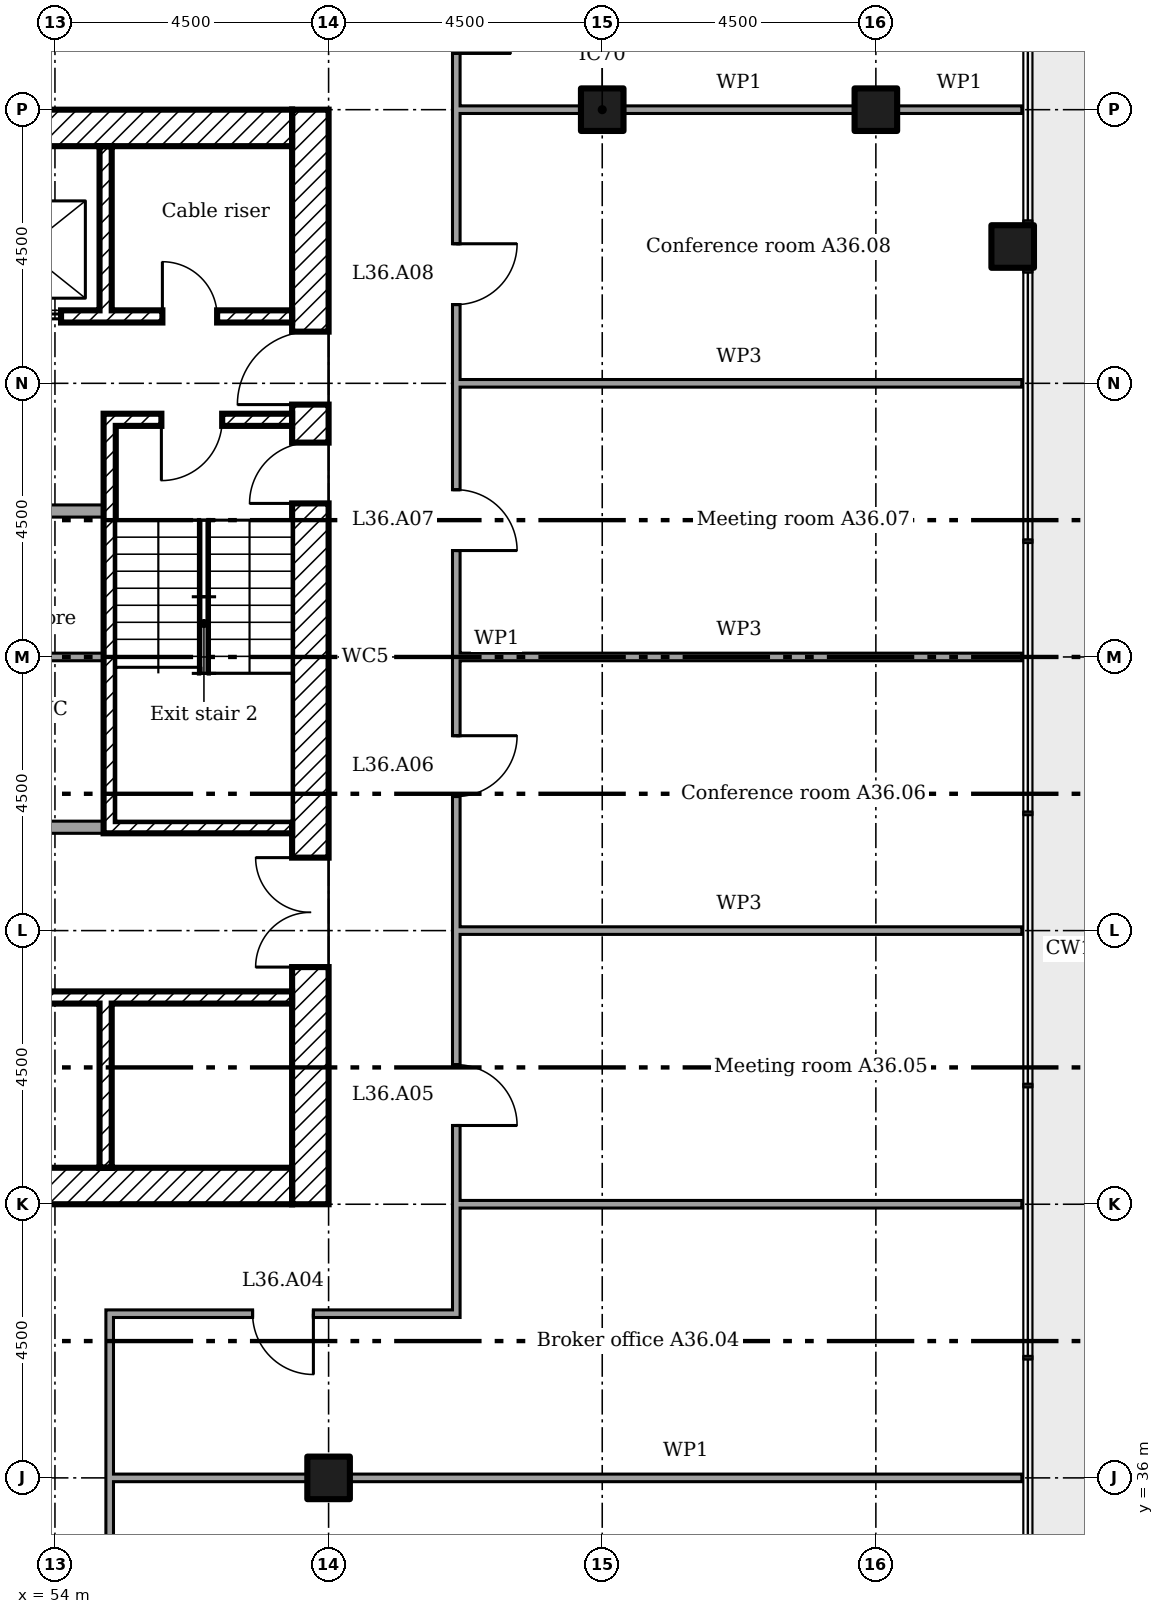
"""IFC4 building model, lengths in metres.
Left out: names, types, materials, properties, quantities, classifications, styles, units other than length and angle.
Written with IfcOpenShell. Run it as: python <this file> out.ifc"""

import sys

from ifc_helpers import new_model, si_unit, direction, frame, frame_2d, origin, origin_2d, place, context, subcontext, project, spatial, rectangle, extrude, element, fill, save


model = new_model("IFC4")
c1 = context("Model", 3, precision=1e-05, world=origin(), true_north=direction((0.0, 1.0)))
c2 = subcontext(c1, "Body", "Model", "MODEL_VIEW")
j1 = project(units=[si_unit("LENGTHUNIT", "METRE"), si_unit("PLANEANGLEUNIT", "RADIAN")], contexts=[c1])
p1 = place(None, origin())
s1 = spatial("IfcSite", under=j1, at=p1, CompositionType="ELEMENT")
p2 = place(p1, origin())
s2 = spatial("IfcBuilding", under=s1, at=p2, CompositionType="ELEMENT")
p3 = place(p2, frame((0.0, 0.0, 147.4)))
s3 = spatial("IfcBuildingStorey", under=s2, at=p3, CompositionType="ELEMENT", Elevation=147.4)
for number, where in (
    (1, (58.5, 36.0, 0.0)),
    (2, (63.0, 58.5, 0.0)),
    (3, (67.5, 58.5, 0.0)),
    (4, (69.75, 56.25, 0.0)),
):
    element("IfcColumn", number, at=place(p3, frame(where)), inside=s3, PredefinedType="COLUMN", context=c2, shape_type="SweptSolid", body=[
        extrude(rectangle(XDim=0.7, YDim=0.7, at=origin_2d()), origin(), (0.0, 0.0, 1.0), 3.6),
    ])
p4 = place(p3, frame((58.2, 40.5, 0.0), z_axis=(0.0, 0.0, 1.0), x_axis=(0.0, 1.0, 0.0)))
e5 = element("IfcWall", 5, at=p4, inside=s3, PredefinedType="SHEAR", context=c2, shape_type="SweptSolid", body=[
    extrude(rectangle(XDim=18.0, YDim=0.6, at=frame_2d((9.0, 0.0))), origin(), (0.0, 0.0, 1.0), 3.35),
])
p5 = place(p4, frame((13.15, 0.0, 0.0)))
e6 = element("IfcOpeningElement", 6, at=p5, cuts=e5, PredefinedType="OPENING", context=c2, shape_type="SweptSolid", body=[
    extrude(rectangle(XDim=1.2, YDim=2.1, at=frame_2d((0.6, 1.05))), frame((0.0, 0.31, 0.0), z_axis=(0.0, -1.0, 0.0), x_axis=(1.0, 0.0, 0.0)), (0.0, 0.0, 1.0), 0.62),
])
p6 = place(p4, frame((3.9, 0.0, 0.0)))
e7 = element("IfcOpeningElement", 7, at=p6, cuts=e5, PredefinedType="OPENING", context=c2, shape_type="SweptSolid", body=[
    extrude(rectangle(XDim=1.8, YDim=2.1, at=frame_2d((0.9, 1.05))), frame((0.0, 0.31, 0.0), z_axis=(0.0, -1.0, 0.0), x_axis=(1.0, 0.0, 0.0)), (0.0, 0.0, 1.0), 0.62),
])
p7 = place(p4, frame((11.525, 0.0, 0.0)))
e8 = element("IfcOpeningElement", 8, at=p7, cuts=e5, PredefinedType="OPENING", context=c2, shape_type="SweptSolid", body=[
    extrude(rectangle(XDim=1.0, YDim=2.1, at=frame_2d((0.5, 1.05))), frame((0.0, 0.31, 0.0), z_axis=(0.0, -1.0, 0.0), x_axis=(1.0, 0.0, 0.0)), (0.0, 0.0, 1.0), 0.62),
])
for number, where in (
    (9, (40.5, 58.2, 0.0)),
    (10, (40.5, 40.8, 0.0)),
):
    element("IfcWall", number, at=place(p3, frame(where)), inside=s3, PredefinedType="SHEAR", context=c2, shape_type="SweptSolid", body=[
        extrude(rectangle(XDim=17.4, YDim=0.6, at=frame_2d((8.7, 0.0))), origin(), (0.0, 0.0, 1.0), 3.35),
    ])
for number, where, z_axis, x_axis in (
    (11, (54.833, 57.9, 0.0), (0.0, 0.0, 1.0), (0.0, -1.0, 0.0)),
    (12, (54.833, 41.1, 0.0), (0.0, 0.0, 1.0), (0.0, 1.0, 0.0)),
):
    element("IfcWall", number, at=place(p3, frame(where, z_axis=z_axis, x_axis=x_axis)), inside=s3, PredefinedType="SHEAR", context=c2, shape_type="SweptSolid", body=[
        extrude(rectangle(XDim=2.7, YDim=0.2, at=frame_2d((1.35, 0.0))), origin(), (0.0, 0.0, 1.0), 3.35),
    ])
p8 = place(p3, frame((46.933, 55.1, 0.0)))
e13 = element("IfcWall", 13, at=p8, inside=s3, PredefinedType="SHEAR", context=c2, shape_type="SweptSolid", body=[
    extrude(rectangle(XDim=10.967, YDim=0.2, at=frame_2d((5.483, 0.0))), origin(), (0.0, 0.0, 1.0), 3.35),
])
p9 = place(p8, frame((8.833, 0.0, 0.0)))
e14 = element("IfcOpeningElement", 14, at=p9, cuts=e13, PredefinedType="OPENING", context=c2, shape_type="SweptSolid", body=[
    extrude(rectangle(XDim=0.9, YDim=2.1, at=frame_2d((0.45, 1.05))), frame((0.0, 0.11, 0.0), z_axis=(0.0, -1.0, 0.0), x_axis=(1.0, 0.0, 0.0)), (0.0, 0.0, 1.0), 0.22),
])
p10 = place(p8, frame((0.633, 0.0, 0.0)))
e15 = element("IfcOpeningElement", 15, at=p10, cuts=e13, PredefinedType="OPENING", context=c2, shape_type="SweptSolid", body=[
    extrude(rectangle(XDim=1.2, YDim=2.1, at=frame_2d((0.6, 1.05))), frame((0.0, 0.11, 0.0), z_axis=(0.0, -1.0, 0.0), x_axis=(1.0, 0.0, 0.0)), (0.0, 0.0, 1.0), 0.22),
])
p11 = place(p8, frame((3.3, 0.0, 0.0)))
e16 = element("IfcOpeningElement", 16, at=p11, cuts=e13, PredefinedType="OPENING", context=c2, shape_type="SweptSolid", body=[
    extrude(rectangle(XDim=1.2, YDim=2.1, at=frame_2d((0.6, 1.05))), frame((0.0, 0.11, 0.0), z_axis=(0.0, -1.0, 0.0), x_axis=(1.0, 0.0, 0.0)), (0.0, 0.0, 1.0), 0.22),
])
p12 = place(p8, frame((5.967, 0.0, 0.0)))
e17 = element("IfcOpeningElement", 17, at=p12, cuts=e13, PredefinedType="OPENING", context=c2, shape_type="SweptSolid", body=[
    extrude(rectangle(XDim=1.2, YDim=2.1, at=frame_2d((0.6, 1.05))), frame((0.0, 0.11, 0.0), z_axis=(0.0, -1.0, 0.0), x_axis=(1.0, 0.0, 0.0)), (0.0, 0.0, 1.0), 0.22),
])
p13 = place(p3, frame((41.1, 43.9, 0.0)))
e18 = element("IfcWall", 18, at=p13, inside=s3, PredefinedType="SHEAR", context=c2, shape_type="SweptSolid", body=[
    extrude(rectangle(XDim=16.8, YDim=0.2, at=frame_2d((8.4, 0.0))), origin(), (0.0, 0.0, 1.0), 3.35),
])
p14 = place(p13, frame((6.617, 0.0, 0.0)))
e19 = element("IfcOpeningElement", 19, at=p14, cuts=e18, PredefinedType="OPENING", context=c2, shape_type="SweptSolid", body=[
    extrude(rectangle(XDim=0.9, YDim=2.1, at=frame_2d((0.45, 1.05))), frame((0.0, 0.11, 0.0), z_axis=(0.0, -1.0, 0.0), x_axis=(1.0, 0.0, 0.0)), (0.0, 0.0, 1.0), 0.22),
])
p15 = place(p3, frame((54.8, 53.4, 0.0)))
e20 = element("IfcWall", 20, at=p15, inside=s3, PredefinedType="SHEAR", context=c2, shape_type="SweptSolid", body=[
    extrude(rectangle(XDim=3.1, YDim=0.2, at=frame_2d((1.55, 0.0))), origin(), (0.0, 0.0, 1.0), 3.35),
])
p16 = place(p15, frame((0.95, 0.0, 0.0)))
e21 = element("IfcOpeningElement", 21, at=p16, cuts=e20, PredefinedType="OPENING", context=c2, shape_type="SweptSolid", body=[
    extrude(rectangle(XDim=1.0, YDim=2.1, at=frame_2d((0.5, 1.05))), frame((0.0, 0.11, 0.0), z_axis=(0.0, -1.0, 0.0), x_axis=(1.0, 0.0, 0.0)), (0.0, 0.0, 1.0), 0.22),
])
p17 = place(p3, frame((54.8, 46.7, 0.0)))
e22 = element("IfcWall", 22, at=p17, inside=s3, PredefinedType="SHEAR", context=c2, shape_type="SweptSolid", body=[
    extrude(rectangle(XDim=3.1, YDim=0.2, at=frame_2d((1.55, 0.0))), origin(), (0.0, 0.0, 1.0), 3.35),
])
p18 = place(p3, frame((54.9, 46.8, 0.0), z_axis=(0.0, 0.0, 1.0), x_axis=(0.0, 1.0, 0.0)))
e23 = element("IfcWall", 23, at=p18, inside=s3, PredefinedType="SHEAR", context=c2, shape_type="SweptSolid", body=[
    extrude(rectangle(XDim=6.5, YDim=0.2, at=frame_2d((3.25, 0.0))), origin(), (0.0, 0.0, 1.0), 3.35),
])
p19 = place(p3, frame((44.2, 51.9, 0.0)))
e24 = element("IfcWall", 24, at=p19, inside=s3, PredefinedType="PARTITIONING", context=c2, shape_type="SweptSolid", body=[
    extrude(rectangle(XDim=10.6, YDim=0.2, at=frame_2d((5.3, 0.0))), origin(), (0.0, 0.0, 1.0), 3.35),
])
p20 = place(p19, frame((8.45, 0.0, 0.0)))
e25 = element("IfcOpeningElement", 25, at=p20, cuts=e24, PredefinedType="OPENING", context=c2, shape_type="SweptSolid", body=[
    extrude(rectangle(XDim=0.9, YDim=2.1, at=frame_2d((0.45, 1.05))), frame((0.0, 0.11, 0.0), z_axis=(0.0, -1.0, 0.0), x_axis=(1.0, 0.0, 0.0)), (0.0, 0.0, 1.0), 0.22),
])
p21 = place(p3, frame((44.2, 46.7, 0.0)))
e26 = element("IfcWall", 26, at=p21, inside=s3, PredefinedType="PARTITIONING", context=c2, shape_type="SweptSolid", body=[
    extrude(rectangle(XDim=10.6, YDim=0.2, at=frame_2d((5.3, 0.0))), origin(), (0.0, 0.0, 1.0), 3.35),
])
p22 = place(p21, frame((1.4, 0.0, 0.0)))
e27 = element("IfcOpeningElement", 27, at=p22, cuts=e26, PredefinedType="OPENING", context=c2, shape_type="SweptSolid", body=[
    extrude(rectangle(XDim=0.9, YDim=2.1, at=frame_2d((0.45, 1.05))), frame((0.0, 0.11, 0.0), z_axis=(0.0, -1.0, 0.0), x_axis=(1.0, 0.0, 0.0)), (0.0, 0.0, 1.0), 0.22),
])
p23 = place(p21, frame((5.0, 0.0, 0.0)))
e28 = element("IfcOpeningElement", 28, at=p23, cuts=e26, PredefinedType="OPENING", context=c2, shape_type="SweptSolid", body=[
    extrude(rectangle(XDim=0.9, YDim=2.1, at=frame_2d((0.45, 1.05))), frame((0.0, 0.11, 0.0), z_axis=(0.0, -1.0, 0.0), x_axis=(1.0, 0.0, 0.0)), (0.0, 0.0, 1.0), 0.22),
])
p24 = place(p21, frame((8.45, 0.0, 0.0)))
e29 = element("IfcOpeningElement", 29, at=p24, cuts=e26, PredefinedType="OPENING", context=c2, shape_type="SweptSolid", body=[
    extrude(rectangle(XDim=0.9, YDim=2.1, at=frame_2d((0.45, 1.05))), frame((0.0, 0.11, 0.0), z_axis=(0.0, -1.0, 0.0), x_axis=(1.0, 0.0, 0.0)), (0.0, 0.0, 1.0), 0.22),
])
p25 = place(p3, frame((54.8, 49.5, 0.0), z_axis=(0.0, 0.0, 1.0), x_axis=(-1.0, 0.0, 0.0)))
e30 = element("IfcWall", 30, at=p25, inside=s3, PredefinedType="PARTITIONING", context=c2, shape_type="SweptSolid", body=[
    extrude(rectangle(XDim=3.338, YDim=0.125, at=frame_2d((1.669, 0.0))), origin(), (0.0, 0.0, 1.0), 3.35),
])
p26 = place(p3, frame((54.9, 36.0, 0.0)))
e31 = element("IfcWall", 31, at=p26, inside=s3, PredefinedType="PARTITIONING", context=c2, shape_type="SweptSolid", body=[
    extrude(rectangle(XDim=3.25, YDim=0.125, at=frame_2d((1.625, 0.0))), origin(), (0.0, 0.0, 1.0), 3.45),
])
p27 = place(p3, frame((58.85, 36.0, 0.0)))
e32 = element("IfcWall", 32, at=p27, inside=s3, PredefinedType="PARTITIONING", context=c2, shape_type="SweptSolid", body=[
    extrude(rectangle(XDim=11.05, YDim=0.125, at=frame_2d((5.525, 0.0))), origin(), (0.0, 0.0, 1.0), 2.766),
])
p28 = place(p3, frame((54.837, 38.7, 0.0)))
e33 = element("IfcWall", 33, at=p28, inside=s3, PredefinedType="PARTITIONING", context=c2, shape_type="SweptSolid", body=[
    extrude(rectangle(XDim=5.825, YDim=0.125, at=frame_2d((2.913, 0.0))), origin(), (0.0, 0.0, 1.0), 3.45),
])
p29 = place(p28, frame((2.413, 0.0, 0.0)))
e34 = element("IfcOpeningElement", 34, at=p29, cuts=e33, PredefinedType="OPENING", context=c2, shape_type="SweptSolid", body=[
    extrude(rectangle(XDim=1.0, YDim=2.1, at=frame_2d((0.5, 1.05))), frame((0.0, 0.073, 0.0), z_axis=(0.0, -1.0, 0.0), x_axis=(1.0, 0.0, 0.0)), (0.0, 0.0, 1.0), 0.145),
])
p30 = place(p3, frame((60.6, 40.5, 0.0)))
e35 = element("IfcWall", 35, at=p30, inside=s3, PredefinedType="PARTITIONING", context=c2, shape_type="SweptSolid", body=[
    extrude(rectangle(XDim=9.3, YDim=0.125, at=frame_2d((4.65, 0.0))), origin(), (0.0, 0.0, 1.0), 2.766),
])
for number, where in (
    (36, (60.6, 45.0, 0.0)),
    (37, (60.6, 49.5, 0.0)),
    (38, (60.6, 54.0, 0.0)),
):
    element("IfcWall", number, at=place(p3, frame(where)), inside=s3, PredefinedType="MOVABLE", context=c2, shape_type="SweptSolid", body=[
        extrude(rectangle(XDim=9.3, YDim=0.125, at=frame_2d((4.65, 0.0))), origin(), (0.0, 0.0, 1.0), 2.766),
    ])
p31 = place(p3, frame((60.6, 58.5, 0.0)))
e39 = element("IfcWall", 39, at=p31, inside=s3, PredefinedType="PARTITIONING", context=c2, shape_type="SweptSolid", body=[
    extrude(rectangle(XDim=2.05, YDim=0.125, at=frame_2d((1.025, 0.0))), origin(), (0.0, 0.0, 1.0), 2.676),
])
p32 = place(p3, frame((63.35, 58.5, 0.0)))
e40 = element("IfcWall", 40, at=p32, inside=s3, PredefinedType="PARTITIONING", context=c2, shape_type="SweptSolid", body=[
    extrude(rectangle(XDim=3.8, YDim=0.125, at=frame_2d((1.9, 0.0))), origin(), (0.0, 0.0, 1.0), 2.676),
])
p33 = place(p3, frame((67.85, 58.5, 0.0)))
e41 = element("IfcWall", 41, at=p33, inside=s3, PredefinedType="PARTITIONING", context=c2, shape_type="SweptSolid", body=[
    extrude(rectangle(XDim=2.05, YDim=0.125, at=frame_2d((1.025, 0.0))), origin(), (0.0, 0.0, 1.0), 2.676),
])
p34 = place(p3, frame((54.9, 29.1, 0.0), z_axis=(0.0, 0.0, 1.0), x_axis=(0.0, 1.0, 0.0)))
e42 = element("IfcWall", 42, at=p34, inside=s3, PredefinedType="PARTITIONING", context=c2, shape_type="SweptSolid", body=[
    extrude(rectangle(XDim=9.537, YDim=0.125, at=frame_2d((4.769, 0.0))), origin(), (0.0, 0.0, 1.0), 3.45),
])
p35 = place(p34, frame((3.825, 0.0, 0.0)))
e43 = element("IfcOpeningElement", 43, at=p35, cuts=e42, PredefinedType="OPENING", context=c2, shape_type="SweptSolid", body=[
    extrude(rectangle(XDim=1.0, YDim=2.1, at=frame_2d((0.5, 1.05))), frame((0.0, 0.073, 0.0), z_axis=(0.0, -1.0, 0.0), x_axis=(1.0, 0.0, 0.0)), (0.0, 0.0, 1.0), 0.145),
])
p36 = place(p3, frame((60.6, 38.762, 0.0), z_axis=(0.0, 0.0, 1.0), x_axis=(0.0, 1.0, 0.0)))
e44 = element("IfcWall", 44, at=p36, inside=s3, PredefinedType="PARTITIONING", context=c2, shape_type="SweptSolid", body=[
    extrude(rectangle(XDim=22.075, YDim=0.125, at=frame_2d((11.038, 0.0))), origin(), (0.0, 0.0, 1.0), 3.45),
])
p37 = place(p36, frame((3.032, 0.0, 0.0)))
e45 = element("IfcOpeningElement", 45, at=p37, cuts=e44, PredefinedType="OPENING", context=c2, shape_type="SweptSolid", body=[
    extrude(rectangle(XDim=1.0, YDim=2.1, at=frame_2d((0.5, 1.05))), frame((0.0, 0.073, 0.0), z_axis=(0.0, -1.0, 0.0), x_axis=(1.0, 0.0, 0.0)), (0.0, 0.0, 1.0), 0.145),
])
p38 = place(p36, frame((8.442, 0.0, 0.0)))
e46 = element("IfcOpeningElement", 46, at=p38, cuts=e44, PredefinedType="OPENING", context=c2, shape_type="SweptSolid", body=[
    extrude(rectangle(XDim=1.0, YDim=2.1, at=frame_2d((0.5, 1.05))), frame((0.0, 0.073, 0.0), z_axis=(0.0, -1.0, 0.0), x_axis=(1.0, 0.0, 0.0)), (0.0, 0.0, 1.0), 0.145),
])
p39 = place(p36, frame((12.488, 0.0, 0.0)))
e47 = element("IfcOpeningElement", 47, at=p39, cuts=e44, PredefinedType="OPENING", context=c2, shape_type="SweptSolid", body=[
    extrude(rectangle(XDim=1.0, YDim=2.1, at=frame_2d((0.5, 1.05))), frame((0.0, 0.073, 0.0), z_axis=(0.0, -1.0, 0.0), x_axis=(1.0, 0.0, 0.0)), (0.0, 0.0, 1.0), 0.145),
])
p40 = place(p36, frame((16.532, 0.0, 0.0)))
e48 = element("IfcOpeningElement", 48, at=p40, cuts=e44, PredefinedType="OPENING", context=c2, shape_type="SweptSolid", body=[
    extrude(rectangle(XDim=1.0, YDim=2.1, at=frame_2d((0.5, 1.05))), frame((0.0, 0.073, 0.0), z_axis=(0.0, -1.0, 0.0), x_axis=(1.0, 0.0, 0.0)), (0.0, 0.0, 1.0), 0.145),
])
p41 = place(p36, frame((20.663, 0.0, 0.0)))
e49 = element("IfcOpeningElement", 49, at=p41, cuts=e44, PredefinedType="OPENING", context=c2, shape_type="SweptSolid", body=[
    extrude(rectangle(XDim=0.9, YDim=2.1, at=frame_2d((0.45, 1.05))), frame((0.0, 0.073, 0.0), z_axis=(0.0, -1.0, 0.0), x_axis=(1.0, 0.0, 0.0)), (0.0, 0.0, 1.0), 0.145),
])
p42 = place(p5, origin())
e50 = element("IfcDoor", 50, at=p42, inside=s3, OperationType="SINGLE_SWING_RIGHT", PredefinedType="DOOR", context=c2, shape_type="SweptSolid", body=[
    extrude(rectangle(XDim=1.2, YDim=2.1, at=frame_2d((0.6, 1.05))), frame((0.0, 0.025, 0.0), z_axis=(0.0, -1.0, 0.0), x_axis=(1.0, 0.0, 0.0)), (0.0, 0.0, 1.0), 0.05),
])
fill(e6, e50)
p43 = place(p6, origin())
e51 = element("IfcDoor", 51, at=p43, inside=s3, OperationType="DOUBLE_DOOR_SINGLE_SWING", PredefinedType="DOOR", context=c2, shape_type="SweptSolid", body=[
    extrude(rectangle(XDim=1.8, YDim=2.1, at=frame_2d((0.9, 1.05))), frame((0.0, 0.025, 0.0), z_axis=(0.0, -1.0, 0.0), x_axis=(1.0, 0.0, 0.0)), (0.0, 0.0, 1.0), 0.05),
])
fill(e7, e51)
p44 = place(p16, frame((1.0, 0.0, 0.0), x_axis=(-1.0, 0.0, 0.0)))
e52 = element("IfcDoor", 52, at=p44, inside=s3, OperationType="SINGLE_SWING_LEFT", PredefinedType="DOOR", context=c2, shape_type="SweptSolid", body=[
    extrude(rectangle(XDim=1.0, YDim=2.1, at=frame_2d((0.5, 1.05))), frame((0.0, 0.025, 0.0), z_axis=(0.0, -1.0, 0.0), x_axis=(1.0, 0.0, 0.0)), (0.0, 0.0, 1.0), 0.05),
])
fill(e21, e52)
p45 = place(p7, origin())
e53 = element("IfcDoor", 53, at=p45, inside=s3, OperationType="SINGLE_SWING_RIGHT", PredefinedType="DOOR", context=c2, shape_type="SweptSolid", body=[
    extrude(rectangle(XDim=1.0, YDim=2.1, at=frame_2d((0.5, 1.05))), frame((0.0, 0.025, 0.0), z_axis=(0.0, -1.0, 0.0), x_axis=(1.0, 0.0, 0.0)), (0.0, 0.0, 1.0), 0.05),
])
fill(e8, e53)
p46 = place(p9, origin())
e54 = element("IfcDoor", 54, at=p46, inside=s3, OperationType="SINGLE_SWING_RIGHT", PredefinedType="DOOR", context=c2, shape_type="SweptSolid", body=[
    extrude(rectangle(XDim=0.9, YDim=2.1, at=frame_2d((0.45, 1.05))), frame((0.0, 0.025, 0.0), z_axis=(0.0, -1.0, 0.0), x_axis=(1.0, 0.0, 0.0)), (0.0, 0.0, 1.0), 0.05),
])
fill(e14, e54)
p47 = place(p12, origin())
e55 = element("IfcDoor", 55, at=p47, inside=s3, OperationType="SLIDING_TO_LEFT", PredefinedType="DOOR", context=c2, shape_type="SweptSolid", body=[
    extrude(rectangle(XDim=1.2, YDim=2.1, at=frame_2d((0.6, 1.05))), frame((0.0, 0.025, 0.0), z_axis=(0.0, -1.0, 0.0), x_axis=(1.0, 0.0, 0.0)), (0.0, 0.0, 1.0), 0.05),
])
fill(e17, e55)
p48 = place(p29, frame((1.0, 0.0, 0.0), x_axis=(-1.0, 0.0, 0.0)))
e56 = element("IfcDoor", 56, at=p48, inside=s3, OperationType="SINGLE_SWING_RIGHT", PredefinedType="DOOR", context=c2, shape_type="SweptSolid", body=[
    extrude(rectangle(XDim=1.0, YDim=2.1, at=frame_2d((0.5, 1.05))), frame((0.0, 0.025, 0.0), z_axis=(0.0, -1.0, 0.0), x_axis=(1.0, 0.0, 0.0)), (0.0, 0.0, 1.0), 0.05),
])
fill(e34, e56)
p49 = place(p37, frame((1.0, 0.0, 0.0), x_axis=(-1.0, 0.0, 0.0)))
e57 = element("IfcDoor", 57, at=p49, inside=s3, OperationType="SINGLE_SWING_LEFT", PredefinedType="DOOR", context=c2, shape_type="SweptSolid", body=[
    extrude(rectangle(XDim=1.0, YDim=2.1, at=frame_2d((0.5, 1.05))), frame((0.0, 0.025, 0.0), z_axis=(0.0, -1.0, 0.0), x_axis=(1.0, 0.0, 0.0)), (0.0, 0.0, 1.0), 0.05),
])
fill(e45, e57)
p50 = place(p38, frame((1.0, 0.0, 0.0), x_axis=(-1.0, 0.0, 0.0)))
e58 = element("IfcDoor", 58, at=p50, inside=s3, OperationType="SINGLE_SWING_RIGHT", PredefinedType="DOOR", context=c2, shape_type="SweptSolid", body=[
    extrude(rectangle(XDim=1.0, YDim=2.1, at=frame_2d((0.5, 1.05))), frame((0.0, 0.025, 0.0), z_axis=(0.0, -1.0, 0.0), x_axis=(1.0, 0.0, 0.0)), (0.0, 0.0, 1.0), 0.05),
])
fill(e46, e58)
p51 = place(p39, frame((1.0, 0.0, 0.0), x_axis=(-1.0, 0.0, 0.0)))
e59 = element("IfcDoor", 59, at=p51, inside=s3, OperationType="SINGLE_SWING_LEFT", PredefinedType="DOOR", context=c2, shape_type="SweptSolid", body=[
    extrude(rectangle(XDim=1.0, YDim=2.1, at=frame_2d((0.5, 1.05))), frame((0.0, 0.025, 0.0), z_axis=(0.0, -1.0, 0.0), x_axis=(1.0, 0.0, 0.0)), (0.0, 0.0, 1.0), 0.05),
])
fill(e47, e59)
p52 = place(p40, frame((1.0, 0.0, 0.0), x_axis=(-1.0, 0.0, 0.0)))
e60 = element("IfcDoor", 60, at=p52, inside=s3, OperationType="SINGLE_SWING_RIGHT", PredefinedType="DOOR", context=c2, shape_type="SweptSolid", body=[
    extrude(rectangle(XDim=1.0, YDim=2.1, at=frame_2d((0.5, 1.05))), frame((0.0, 0.025, 0.0), z_axis=(0.0, -1.0, 0.0), x_axis=(1.0, 0.0, 0.0)), (0.0, 0.0, 1.0), 0.05),
])
fill(e48, e60)
p53 = place(p41, frame((0.9, 0.0, 0.0), x_axis=(-1.0, 0.0, 0.0)))
e61 = element("IfcDoor", 61, at=p53, inside=s3, OperationType="SINGLE_SWING_LEFT", PredefinedType="DOOR", context=c2, shape_type="SweptSolid", body=[
    extrude(rectangle(XDim=0.9, YDim=2.1, at=frame_2d((0.45, 1.05))), frame((0.0, 0.025, 0.0), z_axis=(0.0, -1.0, 0.0), x_axis=(1.0, 0.0, 0.0)), (0.0, 0.0, 1.0), 0.05),
])
fill(e49, e61)
save(model, sys.argv[1])
